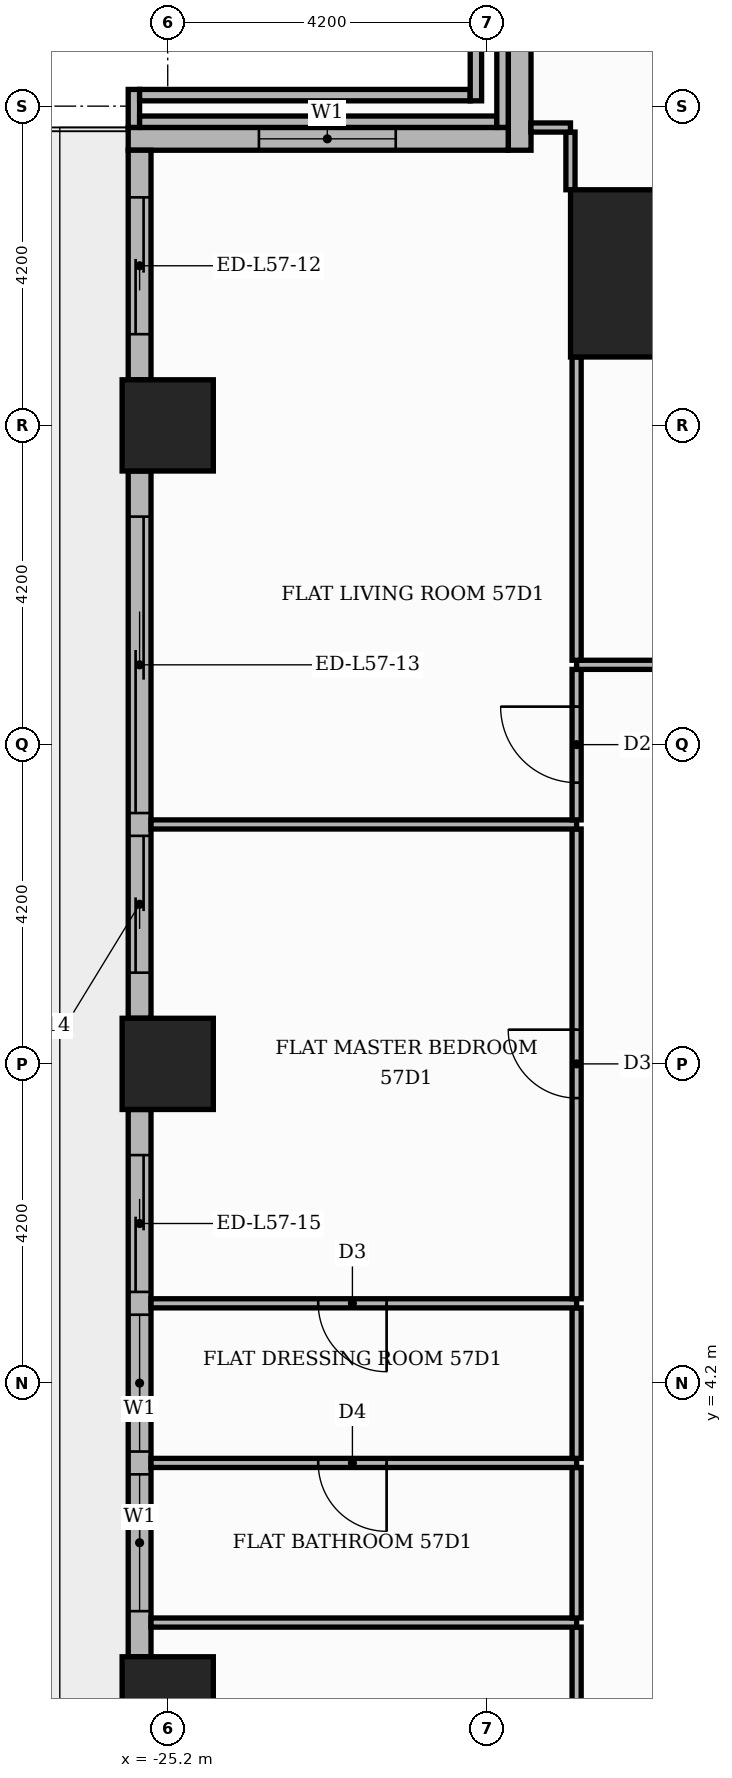
"""IFC4 building model, lengths in metres.
Left out: names, types, materials, properties, quantities, classifications, styles, units other than length and angle.
Written with IfcOpenShell. Run it as: python <this file> out.ifc"""

import sys

from ifc_helpers import new_model, si_unit, direction, frame, frame_2d, origin, origin_2d, place, context, subcontext, project, spatial, rectangle, extrude, element, fill, save


model = new_model("IFC4")
c1 = context("Model", 3, precision=1e-05, world=origin(), true_north=direction((0.0, 1.0)))
c2 = subcontext(c1, "Body", "Model", "MODEL_VIEW")
j1 = project(units=[si_unit("LENGTHUNIT", "METRE"), si_unit("PLANEANGLEUNIT", "RADIAN")], contexts=[c1])
p1 = place(None, origin())
s1 = spatial("IfcSite", under=j1, at=p1, CompositionType="ELEMENT")
p2 = place(p1, origin())
s2 = spatial("IfcBuilding", under=s1, at=p2, CompositionType="ELEMENT")
p3 = place(p2, frame((0.0, 0.0, 240.6)))
s3 = spatial("IfcBuildingStorey", under=s2, at=p3, CompositionType="ELEMENT", Elevation=240.6)
p4 = place(p3, frame((-18.8, 18.8, 0.0), z_axis=(0.0, 0.0, 1.0), x_axis=(1.0, 0.0, 0.0)))
e1 = element("IfcColumn", 1, at=p4, inside=s3, PredefinedType="COLUMN", context=c2, shape_type="SweptSolid", body=[
    extrude(rectangle(XDim=2.2, YDim=2.2, at=origin_2d()), origin(), (0.0, 0.0, 1.0), 3.9),
])
for number, where, z_axis, x_axis in (
    (2, (-25.2, 0.0, 0.0), (0.0, 0.0, 1.0), (1.0, 0.0, 0.0)),
    (3, (-25.2, 8.4, 0.0), (0.0, 0.0, 1.0), (1.0, 0.0, 0.0)),
    (4, (-25.2, 16.8, 0.0), (0.0, 0.0, 1.0), (1.0, 0.0, 0.0)),
):
    element("IfcColumn", number, at=place(p3, frame(where, z_axis=z_axis, x_axis=x_axis)), inside=s3, PredefinedType="COLUMN", context=c2, shape_type="SweptSolid", body=[
        extrude(rectangle(XDim=1.2, YDim=1.2, at=origin_2d()), origin(), (0.0, 0.0, 1.0), 3.9),
    ])
p5 = place(p3, frame((-20.57, 25.42, 0.0), z_axis=(0.0, 0.0, 1.0), x_axis=(0.0, -1.0, 0.0)))
e5 = element("IfcWall", 5, at=p5, inside=s3, PredefinedType="STANDARD", context=c2, shape_type="SweptSolid", body=[
    extrude(rectangle(XDim=5.0, YDim=0.3, at=frame_2d((2.5, 0.0))), origin(), (0.0, 0.0, 1.0), 3.48),
])
p6 = place(p5, frame((1.42, 0.0, 0.9)))
e6 = element("IfcOpeningElement", 6, at=p6, cuts=e5, PredefinedType="OPENING", context=c2, shape_type="SweptSolid", body=[
    extrude(rectangle(XDim=1.8, YDim=2.1, at=frame_2d((0.9, 1.05))), frame((0.0, 0.16, 0.0), z_axis=(0.0, -1.0, 0.0), x_axis=(1.0, 0.0, 0.0)), (0.0, 0.0, 1.0), 0.32),
])
p7 = place(p3, frame((-20.72, 20.57, 0.0), z_axis=(0.0, 0.0, 1.0), x_axis=(-1.0, 0.0, 0.0)))
e7 = element("IfcWall", 7, at=p7, inside=s3, PredefinedType="STANDARD", context=c2, shape_type="SweptSolid", body=[
    extrude(rectangle(XDim=5.0, YDim=0.3, at=frame_2d((2.5, 0.0))), origin(), (0.0, 0.0, 1.0), 3.48),
])
p8 = place(p7, frame((1.48, 0.0, 0.9)))
e8 = element("IfcOpeningElement", 8, at=p8, cuts=e7, PredefinedType="OPENING", context=c2, shape_type="SweptSolid", body=[
    extrude(rectangle(XDim=1.8, YDim=2.1, at=frame_2d((0.9, 1.05))), frame((0.0, 0.16, 0.0), z_axis=(0.0, -1.0, 0.0), x_axis=(1.0, 0.0, 0.0)), (0.0, 0.0, 1.0), 0.32),
])
p9 = place(p3, frame((-25.57, 20.42, 0.0), z_axis=(0.0, 0.0, 1.0), x_axis=(0.0, -1.0, 0.0)))
e9 = element("IfcWall", 9, at=p9, inside=s3, PredefinedType="STANDARD", context=c2, shape_type="SweptSolid", body=[
    extrude(rectangle(XDim=3.02, YDim=0.3, at=frame_2d((1.51, 0.0))), origin(), (0.0, 0.0, 1.0), 3.48),
])
p10 = place(p9, frame((0.62, 0.0, 0.0)))
e10 = element("IfcOpeningElement", 10, at=p10, cuts=e9, PredefinedType="OPENING", context=c2, shape_type="SweptSolid", body=[
    extrude(rectangle(XDim=1.8, YDim=2.4, at=frame_2d((0.9, 1.2))), frame((0.0, 0.16, 0.0), z_axis=(0.0, -1.0, 0.0), x_axis=(1.0, 0.0, 0.0)), (0.0, 0.0, 1.0), 0.32),
])
p11 = place(p3, frame((-25.57, 16.2, 0.0), z_axis=(0.0, 0.0, 1.0), x_axis=(0.0, -1.0, 0.0)))
e11 = element("IfcWall", 11, at=p11, inside=s3, PredefinedType="STANDARD", context=c2, shape_type="SweptSolid", body=[
    extrude(rectangle(XDim=7.2, YDim=0.3, at=frame_2d((3.6, 0.0))), origin(), (0.0, 0.0, 1.0), 3.48),
])
p12 = place(p11, frame((0.6, 0.0, 0.0)))
e12 = element("IfcOpeningElement", 12, at=p12, cuts=e11, PredefinedType="OPENING", context=c2, shape_type="SweptSolid", body=[
    extrude(rectangle(XDim=3.9, YDim=2.4, at=frame_2d((1.95, 1.2))), frame((0.0, 0.16, 0.0), z_axis=(0.0, -1.0, 0.0), x_axis=(1.0, 0.0, 0.0)), (0.0, 0.0, 1.0), 0.32),
])
p13 = place(p11, frame((4.8, 0.0, 0.0)))
e13 = element("IfcOpeningElement", 13, at=p13, cuts=e11, PredefinedType="OPENING", context=c2, shape_type="SweptSolid", body=[
    extrude(rectangle(XDim=1.8, YDim=2.4, at=frame_2d((0.9, 1.2))), frame((0.0, 0.16, 0.0), z_axis=(0.0, -1.0, 0.0), x_axis=(1.0, 0.0, 0.0)), (0.0, 0.0, 1.0), 0.32),
])
p14 = place(p3, frame((-25.57, 7.8, 0.0), z_axis=(0.0, 0.0, 1.0), x_axis=(0.0, -1.0, 0.0)))
e14 = element("IfcWall", 14, at=p14, inside=s3, PredefinedType="STANDARD", context=c2, shape_type="SweptSolid", body=[
    extrude(rectangle(XDim=7.2, YDim=0.3, at=frame_2d((3.6, 0.0))), origin(), (0.0, 0.0, 1.0), 3.48),
])
p15 = place(p14, frame((0.6, 0.0, 0.0)))
e15 = element("IfcOpeningElement", 15, at=p15, cuts=e14, PredefinedType="OPENING", context=c2, shape_type="SweptSolid", body=[
    extrude(rectangle(XDim=1.8, YDim=2.4, at=frame_2d((0.9, 1.2))), frame((0.0, 0.16, 0.0), z_axis=(0.0, -1.0, 0.0), x_axis=(1.0, 0.0, 0.0)), (0.0, 0.0, 1.0), 0.32),
])
p16 = place(p14, frame((2.7, 0.0, 0.9)))
e16 = element("IfcOpeningElement", 16, at=p16, cuts=e14, PredefinedType="OPENING", context=c2, shape_type="SweptSolid", body=[
    extrude(rectangle(XDim=1.8, YDim=2.1, at=frame_2d((0.9, 1.05))), frame((0.0, 0.16, 0.0), z_axis=(0.0, -1.0, 0.0), x_axis=(1.0, 0.0, 0.0)), (0.0, 0.0, 1.0), 0.32),
])
p17 = place(p14, frame((4.8, 0.0, 0.9)))
e17 = element("IfcOpeningElement", 17, at=p17, cuts=e14, PredefinedType="OPENING", context=c2, shape_type="SweptSolid", body=[
    extrude(rectangle(XDim=1.8, YDim=2.1, at=frame_2d((0.9, 1.05))), frame((0.0, 0.16, 0.0), z_axis=(0.0, -1.0, 0.0), x_axis=(1.0, 0.0, 0.0)), (0.0, 0.0, 1.0), 0.32),
])
p18 = place(p3, frame((-25.645, 20.72, 0.0), z_axis=(0.0, 0.0, 1.0), x_axis=(0.0, 1.0, 0.0)))
e18 = element("IfcWall", 18, at=p18, inside=s3, PredefinedType="PARAPET", context=c2, shape_type="SweptSolid", body=[
    extrude(rectangle(XDim=0.5, YDim=0.15, at=frame_2d((0.25, 0.0))), origin(), (0.0, 0.0, 1.0), 1.1),
])
p19 = place(p3, frame((-25.57, 21.145, 0.0), z_axis=(0.0, 0.0, 1.0), x_axis=(1.0, 0.0, 0.0)))
e19 = element("IfcWall", 19, at=p19, inside=s3, PredefinedType="PARAPET", context=c2, shape_type="SweptSolid", body=[
    extrude(rectangle(XDim=4.35, YDim=0.15, at=frame_2d((2.175, 0.0))), origin(), (0.0, 0.0, 1.0), 1.1),
])
p20 = place(p3, frame((-25.57, 20.795, 0.0), z_axis=(0.0, 0.0, 1.0), x_axis=(1.0, 0.0, 0.0)))
e20 = element("IfcWall", 20, at=p20, inside=s3, PredefinedType="PARAPET", context=c2, shape_type="SweptSolid", body=[
    extrude(rectangle(XDim=4.7, YDim=0.15, at=frame_2d((2.35, 0.0))), origin(), (0.0, 0.0, 1.0), 1.1),
])
p21 = place(p3, frame((-21.145, 21.07, 0.0), z_axis=(0.0, 0.0, 1.0), x_axis=(0.0, 1.0, 0.0)))
e21 = element("IfcWall", 21, at=p21, inside=s3, PredefinedType="PARAPET", context=c2, shape_type="SweptSolid", body=[
    extrude(rectangle(XDim=4.65, YDim=0.15, at=frame_2d((2.325, 0.0))), origin(), (0.0, 0.0, 1.0), 1.1),
])
p22 = place(p3, frame((-20.795, 20.72, 0.0), z_axis=(0.0, 0.0, 1.0), x_axis=(0.0, 1.0, 0.0)))
e22 = element("IfcWall", 22, at=p22, inside=s3, PredefinedType="PARAPET", context=c2, shape_type="SweptSolid", body=[
    extrude(rectangle(XDim=5.0, YDim=0.15, at=frame_2d((2.5, 0.0))), origin(), (0.0, 0.0, 1.0), 1.1),
])
p23 = place(p3, frame((-19.82, -3.09, 0.0), z_axis=(0.0, 0.0, 1.0), x_axis=(0.0, 1.0, 0.0)))
e23 = element("IfcWall", 23, at=p23, inside=s3, PredefinedType="PARTITIONING", context=c2, shape_type="SweptSolid", body=[
    extrude(rectangle(XDim=4.08, YDim=0.12, at=frame_2d((2.04, 0.0))), origin(), (0.0, 0.0, 1.0), 3.48),
])
p24 = place(p23, frame((1.59, 0.0, 0.0)))
e24 = element("IfcOpeningElement", 24, at=p24, cuts=e23, PredefinedType="OPENING", context=c2, shape_type="SweptSolid", body=[
    extrude(rectangle(XDim=0.9, YDim=2.1, at=frame_2d((0.45, 1.05))), frame((0.0, 0.07, 0.0), z_axis=(0.0, -1.0, 0.0), x_axis=(1.0, 0.0, 0.0)), (0.0, 0.0, 1.0), 0.14),
])
p25 = place(p3, frame((-25.42, 1.05, 0.0), z_axis=(0.0, 0.0, 1.0), x_axis=(1.0, 0.0, 0.0)))
e25 = element("IfcWall", 25, at=p25, inside=s3, PredefinedType="PARTITIONING", context=c2, shape_type="SweptSolid", body=[
    extrude(rectangle(XDim=5.6, YDim=0.12, at=frame_2d((2.8, 0.0))), origin(), (0.0, 0.0, 1.0), 3.48),
])
p26 = place(p3, frame((-19.82, 1.11, 0.0), z_axis=(0.0, 0.0, 1.0), x_axis=(0.0, 1.0, 0.0)))
e26 = element("IfcWall", 26, at=p26, inside=s3, PredefinedType="PARTITIONING", context=c2, shape_type="SweptSolid", body=[
    extrude(rectangle(XDim=1.98, YDim=0.12, at=frame_2d((0.99, 0.0))), origin(), (0.0, 0.0, 1.0), 3.48),
])
p27 = place(p3, frame((-25.42, 3.15, 0.0), z_axis=(0.0, 0.0, 1.0), x_axis=(1.0, 0.0, 0.0)))
e27 = element("IfcWall", 27, at=p27, inside=s3, PredefinedType="PARTITIONING", context=c2, shape_type="SweptSolid", body=[
    extrude(rectangle(XDim=5.6, YDim=0.12, at=frame_2d((2.8, 0.0))), origin(), (0.0, 0.0, 1.0), 3.48),
])
p28 = place(p27, frame((2.2, 0.0, 0.0)))
e28 = element("IfcOpeningElement", 28, at=p28, cuts=e27, PredefinedType="OPENING", context=c2, shape_type="SweptSolid", body=[
    extrude(rectangle(XDim=0.9, YDim=2.1, at=frame_2d((0.45, 1.05))), frame((0.0, 0.07, 0.0), z_axis=(0.0, -1.0, 0.0), x_axis=(1.0, 0.0, 0.0)), (0.0, 0.0, 1.0), 0.14),
])
p29 = place(p3, frame((-19.82, 3.21, 0.0), z_axis=(0.0, 0.0, 1.0), x_axis=(0.0, 1.0, 0.0)))
e29 = element("IfcWall", 29, at=p29, inside=s3, PredefinedType="PARTITIONING", context=c2, shape_type="SweptSolid", body=[
    extrude(rectangle(XDim=1.98, YDim=0.12, at=frame_2d((0.99, 0.0))), origin(), (0.0, 0.0, 1.0), 3.48),
])
p30 = place(p3, frame((-25.42, 5.25, 0.0), z_axis=(0.0, 0.0, 1.0), x_axis=(1.0, 0.0, 0.0)))
e30 = element("IfcWall", 30, at=p30, inside=s3, PredefinedType="PARTITIONING", context=c2, shape_type="SweptSolid", body=[
    extrude(rectangle(XDim=5.6, YDim=0.12, at=frame_2d((2.8, 0.0))), origin(), (0.0, 0.0, 1.0), 3.48),
])
p31 = place(p30, frame((2.2, 0.0, 0.0)))
e31 = element("IfcOpeningElement", 31, at=p31, cuts=e30, PredefinedType="OPENING", context=c2, shape_type="SweptSolid", body=[
    extrude(rectangle(XDim=0.9, YDim=2.1, at=frame_2d((0.45, 1.05))), frame((0.0, 0.07, 0.0), z_axis=(0.0, -1.0, 0.0), x_axis=(1.0, 0.0, 0.0)), (0.0, 0.0, 1.0), 0.14),
])
p32 = place(p3, frame((-19.82, 5.31, 0.0), z_axis=(0.0, 0.0, 1.0), x_axis=(0.0, 1.0, 0.0)))
e32 = element("IfcWall", 32, at=p32, inside=s3, PredefinedType="PARTITIONING", context=c2, shape_type="SweptSolid", body=[
    extrude(rectangle(XDim=6.18, YDim=0.12, at=frame_2d((3.09, 0.0))), origin(), (0.0, 0.0, 1.0), 3.48),
])
p33 = place(p32, frame((2.64, 0.0, 0.0)))
e33 = element("IfcOpeningElement", 33, at=p33, cuts=e32, PredefinedType="OPENING", context=c2, shape_type="SweptSolid", body=[
    extrude(rectangle(XDim=0.9, YDim=2.1, at=frame_2d((0.45, 1.05))), frame((0.0, 0.07, 0.0), z_axis=(0.0, -1.0, 0.0), x_axis=(1.0, 0.0, 0.0)), (0.0, 0.0, 1.0), 0.14),
])
p34 = place(p3, frame((-25.42, 11.55, 0.0), z_axis=(0.0, 0.0, 1.0), x_axis=(1.0, 0.0, 0.0)))
e34 = element("IfcWall", 34, at=p34, inside=s3, PredefinedType="PARTITIONING", context=c2, shape_type="SweptSolid", body=[
    extrude(rectangle(XDim=5.6, YDim=0.12, at=frame_2d((2.8, 0.0))), origin(), (0.0, 0.0, 1.0), 3.48),
])
p35 = place(p3, frame((-19.82, 11.61, 0.0), z_axis=(0.0, 0.0, 1.0), x_axis=(0.0, 1.0, 0.0)))
e35 = element("IfcWall", 35, at=p35, inside=s3, PredefinedType="PARTITIONING", context=c2, shape_type="SweptSolid", body=[
    extrude(rectangle(XDim=1.98, YDim=0.12, at=frame_2d((0.99, 0.0))), origin(), (0.0, 0.0, 1.0), 3.48),
])
p36 = place(p35, frame((0.49, 0.0, 0.0)))
e36 = element("IfcOpeningElement", 36, at=p36, cuts=e35, PredefinedType="OPENING", context=c2, shape_type="SweptSolid", body=[
    extrude(rectangle(XDim=1.0, YDim=2.1, at=frame_2d((0.5, 1.05))), frame((0.0, 0.07, 0.0), z_axis=(0.0, -1.0, 0.0), x_axis=(1.0, 0.0, 0.0)), (0.0, 0.0, 1.0), 0.14),
])
p37 = place(p3, frame((-19.82, 13.65, 0.0), z_axis=(0.0, 0.0, 1.0), x_axis=(1.0, 0.0, 0.0)))
e37 = element("IfcWall", 37, at=p37, inside=s3, PredefinedType="PARTITIONING", context=c2, shape_type="SweptSolid", body=[
    extrude(rectangle(XDim=6.17, YDim=0.12, at=frame_2d((3.085, 0.0))), origin(), (0.0, 0.0, 1.0), 3.48),
])
p38 = place(p37, frame((2.635, 0.0, 0.0)))
e38 = element("IfcOpeningElement", 38, at=p38, cuts=e37, PredefinedType="OPENING", context=c2, shape_type="SweptSolid", body=[
    extrude(rectangle(XDim=0.9, YDim=2.1, at=frame_2d((0.45, 1.05))), frame((0.0, 0.07, 0.0), z_axis=(0.0, -1.0, 0.0), x_axis=(1.0, 0.0, 0.0)), (0.0, 0.0, 1.0), 0.14),
])
p39 = place(p3, frame((-19.82, 13.71, 0.0), z_axis=(0.0, 0.0, 1.0), x_axis=(0.0, 1.0, 0.0)))
e39 = element("IfcWall", 39, at=p39, inside=s3, PredefinedType="PARTITIONING", context=c2, shape_type="SweptSolid", body=[
    extrude(rectangle(XDim=3.99, YDim=0.12, at=frame_2d((1.995, 0.0))), origin(), (0.0, 0.0, 1.0), 3.48),
])
p40 = place(p3, frame((-19.901, 19.9, 0.0), z_axis=(0.0, 0.0, 1.0), x_axis=(0.0, 1.0, 0.0)))
e40 = element("IfcWall", 40, at=p40, inside=s3, PredefinedType="PARTITIONING", context=c2, shape_type="SweptSolid", body=[
    extrude(rectangle(XDim=0.759, YDim=0.12, at=frame_2d((0.379, 0.0))), origin(), (0.0, 0.0, 1.0), 3.48),
])
p41 = place(p3, frame((-20.421, 20.719, 0.0), z_axis=(0.0, 0.0, 1.0), x_axis=(1.0, 0.0, 0.0)))
e41 = element("IfcWall", 41, at=p41, inside=s3, PredefinedType="PARTITIONING", context=c2, shape_type="SweptSolid", body=[
    extrude(rectangle(XDim=0.52, YDim=0.12, at=frame_2d((0.26, 0.0))), origin(), (0.0, 0.0, 1.0), 3.48),
])
p42 = place(p8, origin())
e42 = element("IfcWindow", 42, at=p42, inside=s3, PartitioningType="SINGLE_PANEL", PredefinedType="WINDOW", context=c2, shape_type="SweptSolid", body=[
    extrude(rectangle(XDim=1.8, YDim=2.1, at=frame_2d((0.9, 1.05))), frame((0.0, 0.03, 0.0), z_axis=(0.0, -1.0, 0.0), x_axis=(1.0, 0.0, 0.0)), (0.0, 0.0, 1.0), 0.06),
])
fill(e8, e42)
p43 = place(p10, origin())
e43 = element("IfcDoor", 43, at=p43, inside=s3, OperationType="SLIDING_TO_RIGHT", PredefinedType="DOOR", context=c2, shape_type="SweptSolid", body=[
    extrude(rectangle(XDim=1.8, YDim=2.4, at=frame_2d((0.9, 1.2))), frame((0.0, 0.025, 0.0), z_axis=(0.0, -1.0, 0.0), x_axis=(1.0, 0.0, 0.0)), (0.0, 0.0, 1.0), 0.05),
])
fill(e10, e43)
p44 = place(p12, origin())
e44 = element("IfcDoor", 44, at=p44, inside=s3, OperationType="SLIDING_TO_LEFT", PredefinedType="DOOR", context=c2, shape_type="SweptSolid", body=[
    extrude(rectangle(XDim=3.9, YDim=2.4, at=frame_2d((1.95, 1.2))), frame((0.0, 0.025, 0.0), z_axis=(0.0, -1.0, 0.0), x_axis=(1.0, 0.0, 0.0)), (0.0, 0.0, 1.0), 0.05),
])
fill(e12, e44)
p45 = place(p13, origin())
e45 = element("IfcDoor", 45, at=p45, inside=s3, OperationType="SLIDING_TO_RIGHT", PredefinedType="DOOR", context=c2, shape_type="SweptSolid", body=[
    extrude(rectangle(XDim=1.8, YDim=2.4, at=frame_2d((0.9, 1.2))), frame((0.0, 0.025, 0.0), z_axis=(0.0, -1.0, 0.0), x_axis=(1.0, 0.0, 0.0)), (0.0, 0.0, 1.0), 0.05),
])
fill(e13, e45)
p46 = place(p15, origin())
e46 = element("IfcDoor", 46, at=p46, inside=s3, OperationType="SLIDING_TO_LEFT", PredefinedType="DOOR", context=c2, shape_type="SweptSolid", body=[
    extrude(rectangle(XDim=1.8, YDim=2.4, at=frame_2d((0.9, 1.2))), frame((0.0, 0.025, 0.0), z_axis=(0.0, -1.0, 0.0), x_axis=(1.0, 0.0, 0.0)), (0.0, 0.0, 1.0), 0.05),
])
fill(e15, e46)
p47 = place(p16, origin())
e47 = element("IfcWindow", 47, at=p47, inside=s3, PartitioningType="SINGLE_PANEL", PredefinedType="WINDOW", context=c2, shape_type="SweptSolid", body=[
    extrude(rectangle(XDim=1.8, YDim=2.1, at=frame_2d((0.9, 1.05))), frame((0.0, 0.03, 0.0), z_axis=(0.0, -1.0, 0.0), x_axis=(1.0, 0.0, 0.0)), (0.0, 0.0, 1.0), 0.06),
])
fill(e16, e47)
p48 = place(p17, origin())
e48 = element("IfcWindow", 48, at=p48, inside=s3, PartitioningType="SINGLE_PANEL", PredefinedType="WINDOW", context=c2, shape_type="SweptSolid", body=[
    extrude(rectangle(XDim=1.8, YDim=2.1, at=frame_2d((0.9, 1.05))), frame((0.0, 0.03, 0.0), z_axis=(0.0, -1.0, 0.0), x_axis=(1.0, 0.0, 0.0)), (0.0, 0.0, 1.0), 0.06),
])
fill(e17, e48)
p49 = place(p36, origin())
e49 = element("IfcDoor", 49, at=p49, inside=s3, OperationType="SINGLE_SWING_RIGHT", PredefinedType="DOOR", context=c2, shape_type="SweptSolid", body=[
    extrude(rectangle(XDim=1.0, YDim=2.1, at=frame_2d((0.5, 1.05))), frame((0.0, 0.025, 0.0), z_axis=(0.0, -1.0, 0.0), x_axis=(1.0, 0.0, 0.0)), (0.0, 0.0, 1.0), 0.05),
])
fill(e36, e49)
p50 = place(p33, origin())
e50 = element("IfcDoor", 50, at=p50, inside=s3, OperationType="SINGLE_SWING_RIGHT", PredefinedType="DOOR", context=c2, shape_type="SweptSolid", body=[
    extrude(rectangle(XDim=0.9, YDim=2.1, at=frame_2d((0.45, 1.05))), frame((0.0, 0.025, 0.0), z_axis=(0.0, -1.0, 0.0), x_axis=(1.0, 0.0, 0.0)), (0.0, 0.0, 1.0), 0.05),
])
fill(e33, e50)
p51 = place(p31, frame((0.9, 0.0, 0.0), z_axis=(0.0, 0.0, 1.0), x_axis=(-1.0, 0.0, 0.0)))
e51 = element("IfcDoor", 51, at=p51, inside=s3, OperationType="SINGLE_SWING_RIGHT", PredefinedType="DOOR", context=c2, shape_type="SweptSolid", body=[
    extrude(rectangle(XDim=0.9, YDim=2.1, at=frame_2d((0.45, 1.05))), frame((0.0, 0.025, 0.0), z_axis=(0.0, -1.0, 0.0), x_axis=(1.0, 0.0, 0.0)), (0.0, 0.0, 1.0), 0.05),
])
fill(e31, e51)
p52 = place(p28, frame((0.9, 0.0, 0.0), z_axis=(0.0, 0.0, 1.0), x_axis=(-1.0, 0.0, 0.0)))
e52 = element("IfcDoor", 52, at=p52, inside=s3, OperationType="SINGLE_SWING_RIGHT", PredefinedType="DOOR", context=c2, shape_type="SweptSolid", body=[
    extrude(rectangle(XDim=0.9, YDim=2.1, at=frame_2d((0.45, 1.05))), frame((0.0, 0.025, 0.0), z_axis=(0.0, -1.0, 0.0), x_axis=(1.0, 0.0, 0.0)), (0.0, 0.0, 1.0), 0.05),
])
fill(e28, e52)
save(model, sys.argv[1])
